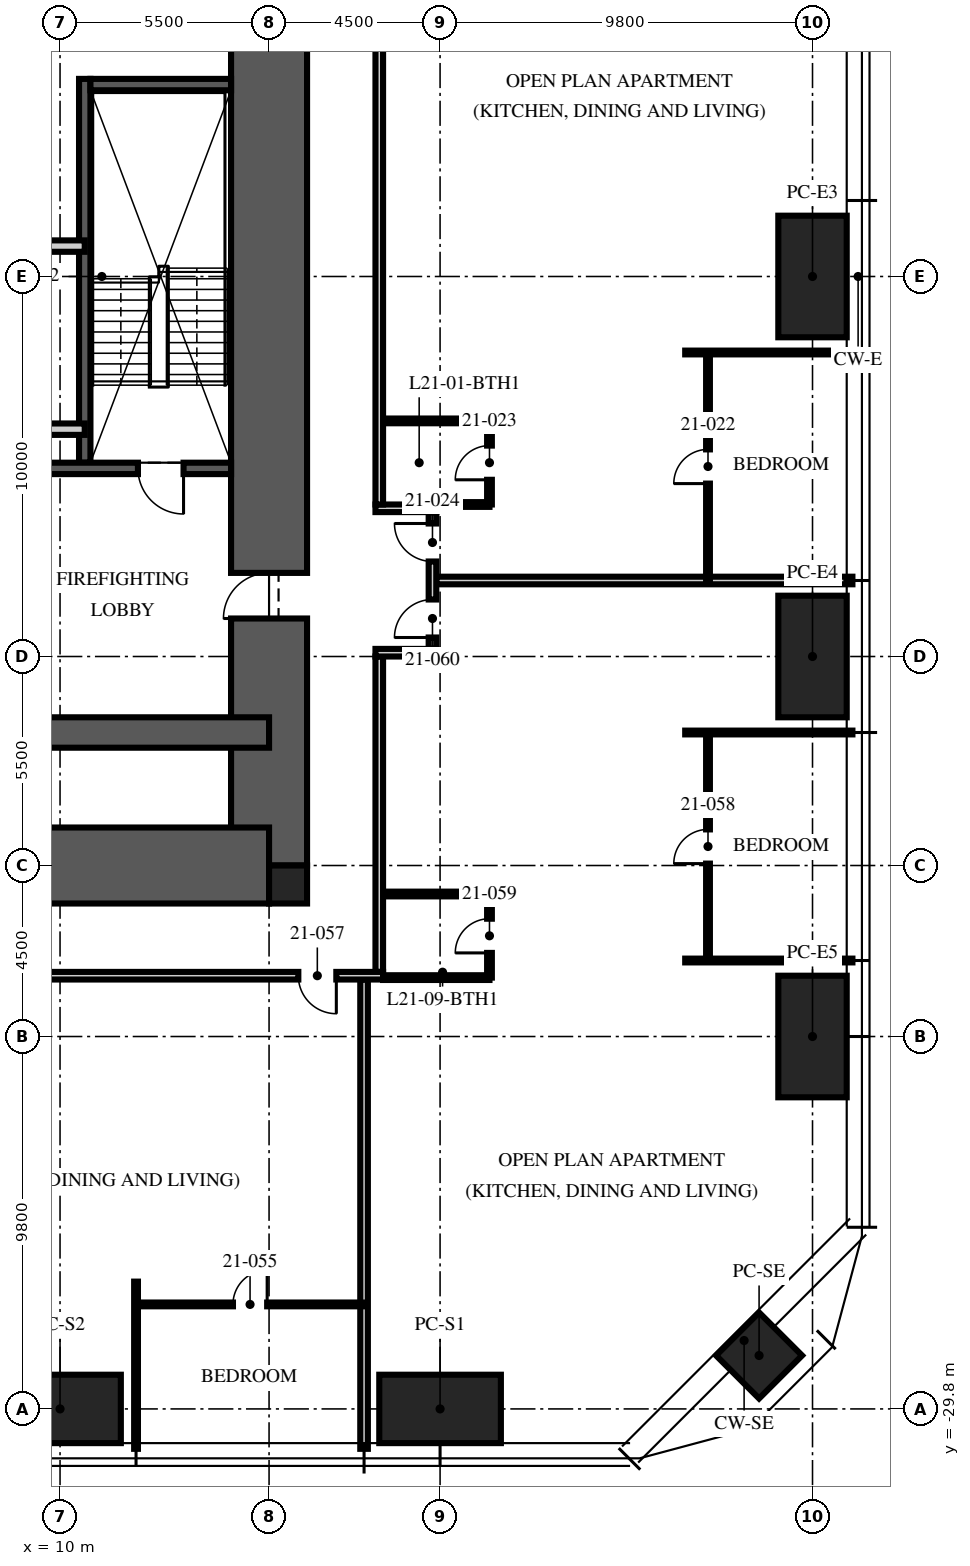
"""IFC4 building model, lengths in metres.
Left out: names, types, materials, properties, quantities, classifications, styles, units other than length and angle.
Written with IfcOpenShell. Run it as: python <this file> out.ifc"""

import sys

from ifc_helpers import new_model, si_unit, direction, frame, frame_2d, origin, origin_2d, place, context, subcontext, project, spatial, rectangle, hollow_rectangle, extrude, element, fill, save


model = new_model("IFC4")
c1 = context("Model", 3, precision=1e-05, world=origin(), true_north=direction((0.0, 1.0)))
c2 = subcontext(c1, "Body", "Model", "MODEL_VIEW")
j1 = project(units=[si_unit("LENGTHUNIT", "METRE"), si_unit("PLANEANGLEUNIT", "RADIAN")], contexts=[c1])
p1 = place(None, origin())
s1 = spatial("IfcSite", under=j1, at=p1, CompositionType="ELEMENT")
p2 = place(p1, origin())
s2 = spatial("IfcBuilding", under=s1, at=p2, CompositionType="ELEMENT")
p3 = place(p2, frame((0.0, 0.0, 84.75)))
s3 = spatial("IfcBuildingStorey", under=s2, at=p3, CompositionType="ELEMENT", Elevation=84.75)
p4 = place(p3, frame((15.5, -15.5, -0.25), z_axis=(0.0, 0.0, 1.0), x_axis=(0.0, 1.0, 0.0)))
e1 = element("IfcWall", 1, at=p4, inside=s3, PredefinedType="SHEAR", context=c2, shape_type="SweptSolid", body=[
    extrude(rectangle(XDim=31.0, YDim=2.0, at=frame_2d((15.5, 0.0))), origin(), (0.0, 0.0, 1.0), 3.75),
])
p5 = place(p4, frame((6.5, 0.0, 0.25)))
e2 = element("IfcOpeningElement", 2, at=p5, cuts=e1, PredefinedType="OPENING", context=c2, shape_type="SweptSolid", body=[
    extrude(rectangle(XDim=1.2, YDim=2.1, at=frame_2d((0.6, 1.05))), frame((0.0, 1.01, 0.0), z_axis=(0.0, -1.0, 0.0), x_axis=(1.0, 0.0, 0.0)), (0.0, 0.0, 1.0), 2.02),
])
p6 = place(p4, frame((23.0, 0.0, 0.25)))
e3 = element("IfcOpeningElement", 3, at=p6, cuts=e1, PredefinedType="OPENING", context=c2, shape_type="SweptSolid", body=[
    extrude(rectangle(XDim=1.8, YDim=2.1, at=frame_2d((0.9, 1.05))), frame((0.0, 1.01, 0.0), z_axis=(0.0, -1.0, 0.0), x_axis=(1.0, 0.0, 0.0)), (0.0, 0.0, 1.0), 2.02),
])
p7 = place(p3, frame((-15.5, -15.5, -0.25), z_axis=(0.0, 0.0, 1.0), x_axis=(1.0, 0.0, 0.0)))
e4 = element("IfcWall", 4, at=p7, inside=s3, PredefinedType="SHEAR", context=c2, shape_type="SweptSolid", body=[
    extrude(rectangle(XDim=31.0, YDim=2.0, at=frame_2d((15.5, 0.0))), origin(), (0.0, 0.0, 1.0), 3.75),
])
p8 = place(p3, frame((-15.5, -12.0, -0.25), z_axis=(0.0, 0.0, 1.0), x_axis=(1.0, 0.0, 0.0)))
e5 = element("IfcWall", 5, at=p8, inside=s3, PredefinedType="SHEAR", context=c2, shape_type="SweptSolid", body=[
    extrude(rectangle(XDim=31.0, YDim=0.8, at=frame_2d((15.5, 0.0))), origin(), (0.0, 0.0, 1.0), 3.75),
])
p9 = place(p3, frame((16.0, -16.0, -0.25), z_axis=(0.0, 0.0, 1.0), x_axis=(1.0, 0.0, 0.0)))
e6 = element("IfcColumn", 6, at=p9, inside=s3, PredefinedType="COLUMN", context=c2, shape_type="SweptSolid", body=[
    extrude(rectangle(XDim=1.0, YDim=1.0, at=origin_2d()), origin(), (0.0, 0.0, 1.0), 3.75),
])
for number, where, z_axis, x_axis in (
    (7, (29.8, 0.0, 0.0), (0.0, 0.0, 1.0), (0.0, 1.0, 0.0)),
    (8, (29.8, -10.0, 0.0), (0.0, 0.0, 1.0), (0.0, 1.0, 0.0)),
    (9, (29.8, -20.0, 0.0), (0.0, 0.0, 1.0), (0.0, 1.0, 0.0)),
    (10, (20.0, -29.8, 0.0), (0.0, 0.0, 1.0), (1.0, 0.0, 0.0)),
    (11, (10.0, -29.8, 0.0), (0.0, 0.0, 1.0), (1.0, 0.0, 0.0)),
):
    element("IfcColumn", number, at=place(p3, frame(where, z_axis=z_axis, x_axis=x_axis)), inside=s3, PredefinedType="COLUMN", context=c2, shape_type="SweptSolid", body=[
        extrude(hollow_rectangle(XDim=3.2, YDim=1.8, WallThickness=0.2, at=origin_2d()), origin(), (0.0, 0.0, 1.0), 3.75),
    ])
p10 = place(p3, frame((28.394, -28.394, 0.0), z_axis=(0.0, 0.0, 1.0), x_axis=(0.707106781187, 0.707106781187, 0.0)))
e12 = element("IfcColumn", 12, at=p10, inside=s3, PredefinedType="COLUMN", context=c2, shape_type="SweptSolid", body=[
    extrude(hollow_rectangle(XDim=1.6, YDim=1.6, WallThickness=0.1, at=origin_2d()), origin(), (0.0, 0.0, 1.0), 3.75),
])
p11 = place(p3, frame((10.65, -4.9, 0.0), z_axis=(0.0, 0.0, 1.0), x_axis=(0.0, 1.0, 0.0)))
e13 = element("IfcWall", 13, at=p11, inside=s3, PredefinedType="SOLIDWALL", context=c2, shape_type="SweptSolid", body=[
    extrude(rectangle(XDim=10.1, YDim=0.3, at=frame_2d((5.05, 0.0))), origin(), (0.0, 0.0, 1.0), 3.5),
])
p12 = place(p3, frame((14.5, -5.05, 0.0), z_axis=(0.0, 0.0, 1.0), x_axis=(-1.0, 0.0, 0.0)))
e14 = element("IfcWall", 14, at=p12, inside=s3, PredefinedType="SOLIDWALL", context=c2, shape_type="SweptSolid", body=[
    extrude(rectangle(XDim=5.7, YDim=0.3, at=frame_2d((2.85, 0.0))), origin(), (0.0, 0.0, 1.0), 3.5),
])
p13 = place(p12, frame((1.25, 0.0, 0.0)))
e15 = element("IfcOpeningElement", 15, at=p13, cuts=e14, PredefinedType="OPENING", context=c2, shape_type="SweptSolid", body=[
    extrude(rectangle(XDim=1.2, YDim=2.1, at=frame_2d((0.6, 1.05))), frame((0.0, 0.16, 0.0), z_axis=(0.0, -1.0, 0.0), x_axis=(1.0, 0.0, 0.0)), (0.0, 0.0, 1.0), 0.32),
])
p14 = place(p3, frame((14.5, 5.05, 0.0), z_axis=(0.0, 0.0, 1.0), x_axis=(-1.0, 0.0, 0.0)))
e16 = element("IfcWall", 16, at=p14, inside=s3, PredefinedType="SOLIDWALL", context=c2, shape_type="SweptSolid", body=[
    extrude(rectangle(XDim=3.7, YDim=0.3, at=frame_2d((1.85, 0.0))), origin(), (0.0, 0.0, 1.0), 3.5),
])
p15 = place(p3, frame((-10.65, 0.8, 0.0), z_axis=(0.0, 0.0, 1.0), x_axis=(1.0, 0.0, 0.0)))
e17 = element("IfcWall", 17, at=p15, inside=s3, PredefinedType="PARTITIONING", context=c2, shape_type="SweptSolid", body=[
    extrude(rectangle(XDim=21.3, YDim=0.3, at=frame_2d((10.65, 0.0))), origin(), (0.0, 0.0, 1.0), 3.5),
])
p16 = place(p15, frame((10.05, 0.0, 0.0)))
e18 = element("IfcOpeningElement", 18, at=p16, cuts=e17, PredefinedType="OPENING", context=c2, shape_type="SweptSolid", body=[
    extrude(rectangle(XDim=1.2, YDim=2.1, at=frame_2d((0.6, 1.05))), frame((0.0, 0.16, 0.0), z_axis=(0.0, -1.0, 0.0), x_axis=(1.0, 0.0, 0.0)), (0.0, 0.0, 1.0), 0.32),
])
p17 = place(p15, frame((0.793, 0.0, 0.0)))
e19 = element("IfcOpeningElement", 19, at=p17, cuts=e17, PredefinedType="OPENING", context=c2, shape_type="SweptSolid", body=[
    extrude(rectangle(XDim=0.9, YDim=2.1, at=frame_2d((0.45, 1.05))), frame((0.0, 0.16, 0.0), z_axis=(0.0, -1.0, 0.0), x_axis=(1.0, 0.0, 0.0)), (0.0, 0.0, 1.0), 0.32),
])
p18 = place(p3, frame((10.65, -4.018, 0.0), z_axis=(0.0, 0.0, 1.0), x_axis=(-1.0, 0.0, 0.0)))
e20 = element("IfcWall", 20, at=p18, inside=s3, PredefinedType="PARTITIONING", context=c2, shape_type="SweptSolid", body=[
    extrude(rectangle(XDim=6.45, YDim=0.3, at=frame_2d((3.225, 0.0))), origin(), (0.0, 0.0, 1.0), 3.5),
])
p19 = place(p3, frame((19.9, -8.0, 0.0), z_axis=(0.0, 0.0, 1.0), x_axis=(1.0, 0.0, 0.0)))
e21 = element("IfcWall", 21, at=p19, inside=s3, PredefinedType="PARTITIONING", context=c2, shape_type="SweptSolid", body=[
    extrude(rectangle(XDim=10.95, YDim=0.2, at=frame_2d((5.475, 0.0))), origin(), (0.0, 0.0, 1.0), 2.71),
])
for number, where, z_axis, x_axis in (
    (22, (26.45, -2.0, 0.0), (0.0, 0.0, 1.0), (1.0, 0.0, 0.0)),
    (23, (12.0, -26.45, 0.0), (0.0, 0.0, 1.0), (0.0, -1.0, 0.0)),
):
    element("IfcWall", number, at=place(p3, frame(where, z_axis=z_axis, x_axis=x_axis)), inside=s3, PredefinedType="PARTITIONING", context=c2, shape_type="SweptSolid", body=[
        extrude(rectangle(XDim=4.4, YDim=0.1, at=frame_2d((2.2, 0.0))), origin(), (0.0, 0.0, 1.0), 2.71),
    ])
p20 = place(p3, frame((18.0, -18.5, 0.0), z_axis=(0.0, 0.0, 1.0), x_axis=(0.0, -1.0, 0.0)))
e24 = element("IfcWall", 24, at=p20, inside=s3, PredefinedType="PARTITIONING", context=c2, shape_type="SweptSolid", body=[
    extrude(rectangle(XDim=12.35, YDim=0.2, at=frame_2d((6.175, 0.0))), origin(), (0.0, 0.0, 1.0), 2.3),
])
for number, where, z_axis, x_axis in (
    (25, (26.45, -18.0, 0.0), (0.0, 0.0, 1.0), (1.0, 0.0, 0.0)),
    (26, (26.45, -12.0, 0.0), (0.0, 0.0, 1.0), (1.0, 0.0, 0.0)),
):
    element("IfcWall", number, at=place(p3, frame(where, z_axis=z_axis, x_axis=x_axis)), inside=s3, PredefinedType="PARTITIONING", context=c2, shape_type="SweptSolid", body=[
        extrude(rectangle(XDim=4.4, YDim=0.1, at=frame_2d((2.2, 0.0))), origin(), (0.0, 0.0, 1.0), 2.71),
    ])
p21 = place(p3, frame((27.05, -8.0, 0.0), z_axis=(0.0, 0.0, 1.0), x_axis=(0.0, 1.0, 0.0)))
e27 = element("IfcWall", 27, at=p21, inside=s3, PredefinedType="PARTITIONING", context=c2, shape_type="SweptSolid", body=[
    extrude(rectangle(XDim=6.0, YDim=0.1, at=frame_2d((3.0, 0.0))), origin(), (0.0, 0.0, 1.0), 2.61),
])
p22 = place(p21, frame((2.55, 0.0, 0.0)))
e28 = element("IfcOpeningElement", 28, at=p22, cuts=e27, PredefinedType="OPENING", context=c2, shape_type="SweptSolid", body=[
    extrude(rectangle(XDim=0.9, YDim=2.1, at=frame_2d((0.45, 1.05))), frame((0.0, 0.06, 0.0), z_axis=(0.0, -1.0, 0.0), x_axis=(1.0, 0.0, 0.0)), (0.0, 0.0, 1.0), 0.12),
])
p23 = place(p3, frame((21.3, -6.0, 0.0), z_axis=(0.0, 0.0, 1.0), x_axis=(0.0, 1.0, 0.0)))
e29 = element("IfcWall", 29, at=p23, inside=s3, PredefinedType="PARTITIONING", context=c2, shape_type="SweptSolid", body=[
    extrude(rectangle(XDim=2.2, YDim=0.125, at=frame_2d((1.1, 0.0))), origin(), (0.0, 0.0, 1.0), 2.61),
])
p24 = place(p23, frame((0.65, 0.0, 0.0)))
e30 = element("IfcOpeningElement", 30, at=p24, cuts=e29, PredefinedType="OPENING", context=c2, shape_type="SweptSolid", body=[
    extrude(rectangle(XDim=0.9, YDim=2.1, at=frame_2d((0.45, 1.05))), frame((0.0, 0.073, 0.0), z_axis=(0.0, -1.0, 0.0), x_axis=(1.0, 0.0, 0.0)), (0.0, 0.0, 1.0), 0.145),
])
p25 = place(p3, frame((19.97, -6.0, 0.0), z_axis=(0.0, 0.0, 1.0), x_axis=(1.0, 0.0, 0.0)))
e31 = element("IfcWall", 31, at=p25, inside=s3, PredefinedType="PARTITIONING", context=c2, shape_type="SweptSolid", body=[
    extrude(rectangle(XDim=1.33, YDim=0.125, at=frame_2d((0.665, 0.0))), origin(), (0.0, 0.0, 1.0), 3.5),
])
p26 = place(p3, frame((18.5, -3.8, 0.0), z_axis=(0.0, 0.0, 1.0), x_axis=(1.0, 0.0, 0.0)))
e32 = element("IfcWall", 32, at=p26, inside=s3, PredefinedType="PARTITIONING", context=c2, shape_type="SweptSolid", body=[
    extrude(rectangle(XDim=2.8, YDim=0.125, at=frame_2d((1.4, 0.0))), origin(), (0.0, 0.0, 1.0), 3.5),
])
p27 = place(p3, frame((12.0, -27.05, 0.0), z_axis=(0.0, 0.0, 1.0), x_axis=(1.0, 0.0, 0.0)))
e33 = element("IfcWall", 33, at=p27, inside=s3, PredefinedType="PARTITIONING", context=c2, shape_type="SweptSolid", body=[
    extrude(rectangle(XDim=6.0, YDim=0.1, at=frame_2d((3.0, 0.0))), origin(), (0.0, 0.0, 1.0), 2.61),
])
p28 = place(p27, frame((2.55, 0.0, 0.0)))
e34 = element("IfcOpeningElement", 34, at=p28, cuts=e33, PredefinedType="OPENING", context=c2, shape_type="SweptSolid", body=[
    extrude(rectangle(XDim=0.9, YDim=2.1, at=frame_2d((0.45, 1.05))), frame((0.0, 0.06, 0.0), z_axis=(0.0, -1.0, 0.0), x_axis=(1.0, 0.0, 0.0)), (0.0, 0.0, 1.0), 0.12),
])
p29 = place(p3, frame((27.05, -18.0, 0.0), z_axis=(0.0, 0.0, 1.0), x_axis=(0.0, 1.0, 0.0)))
e35 = element("IfcWall", 35, at=p29, inside=s3, PredefinedType="PARTITIONING", context=c2, shape_type="SweptSolid", body=[
    extrude(rectangle(XDim=6.0, YDim=0.1, at=frame_2d((3.0, 0.0))), origin(), (0.0, 0.0, 1.0), 2.61),
])
p30 = place(p29, frame((2.55, 0.0, 0.0)))
e36 = element("IfcOpeningElement", 36, at=p30, cuts=e35, PredefinedType="OPENING", context=c2, shape_type="SweptSolid", body=[
    extrude(rectangle(XDim=0.9, YDim=2.1, at=frame_2d((0.45, 1.05))), frame((0.0, 0.06, 0.0), z_axis=(0.0, -1.0, 0.0), x_axis=(1.0, 0.0, 0.0)), (0.0, 0.0, 1.0), 0.12),
])
p31 = place(p3, frame((21.3, -18.45, 0.0), z_axis=(0.0, 0.0, 1.0), x_axis=(0.0, 1.0, 0.0)))
e37 = element("IfcWall", 37, at=p31, inside=s3, PredefinedType="PARTITIONING", context=c2, shape_type="SweptSolid", body=[
    extrude(rectangle(XDim=2.2, YDim=0.125, at=frame_2d((1.1, 0.0))), origin(), (0.0, 0.0, 1.0), 3.5),
])
p32 = place(p31, frame((0.65, 0.0, 0.0)))
e38 = element("IfcOpeningElement", 38, at=p32, cuts=e37, PredefinedType="OPENING", context=c2, shape_type="SweptSolid", body=[
    extrude(rectangle(XDim=0.9, YDim=2.1, at=frame_2d((0.45, 1.05))), frame((0.0, 0.073, 0.0), z_axis=(0.0, -1.0, 0.0), x_axis=(1.0, 0.0, 0.0)), (0.0, 0.0, 1.0), 0.145),
])
p33 = place(p3, frame((18.5, -18.45, 0.0), z_axis=(0.0, 0.0, 1.0), x_axis=(1.0, 0.0, 0.0)))
e39 = element("IfcWall", 39, at=p33, inside=s3, PredefinedType="PARTITIONING", context=c2, shape_type="SweptSolid", body=[
    extrude(rectangle(XDim=2.8, YDim=0.125, at=frame_2d((1.4, 0.0))), origin(), (0.0, 0.0, 1.0), 2.3),
])
p34 = place(p3, frame((18.5, -16.25, 0.0), z_axis=(0.0, 0.0, 1.0), x_axis=(1.0, 0.0, 0.0)))
e40 = element("IfcWall", 40, at=p34, inside=s3, PredefinedType="PARTITIONING", context=c2, shape_type="SweptSolid", body=[
    extrude(rectangle(XDim=2.8, YDim=0.125, at=frame_2d((1.4, 0.0))), origin(), (0.0, 0.0, 1.0), 3.5),
])
p35 = place(p3, frame((18.4, -18.3, 0.0), z_axis=(0.0, 0.0, 1.0), x_axis=(0.0, 1.0, 0.0)))
e41 = element("IfcWall", 41, at=p35, inside=s3, PredefinedType="PARTITIONING", context=c2, shape_type="SweptSolid", body=[
    extrude(rectangle(XDim=8.3, YDim=0.2, at=frame_2d((4.15, 0.0))), origin(), (0.0, 0.0, 1.0), 2.3),
])
p36 = place(p3, frame((18.3, -9.9, 0.0), z_axis=(0.0, 0.0, 1.0), x_axis=(1.0, 0.0, 0.0)))
e42 = element("IfcWall", 42, at=p36, inside=s3, PredefinedType="PARTITIONING", context=c2, shape_type="SweptSolid", body=[
    extrude(rectangle(XDim=1.6, YDim=0.2, at=frame_2d((0.8, 0.0))), origin(), (0.0, 0.0, 1.0), 2.492),
])
p37 = place(p3, frame((18.3, -6.1, 0.0), z_axis=(0.0, 0.0, 1.0), x_axis=(1.0, 0.0, 0.0)))
e43 = element("IfcWall", 43, at=p37, inside=s3, PredefinedType="PARTITIONING", context=c2, shape_type="SweptSolid", body=[
    extrude(rectangle(XDim=1.6, YDim=0.2, at=frame_2d((0.8, 0.0))), origin(), (0.0, 0.0, 1.0), 3.5),
])
p38 = place(p3, frame((19.8, -9.8, 0.0), z_axis=(0.0, 0.0, 1.0), x_axis=(0.0, 1.0, 0.0)))
e44 = element("IfcWall", 44, at=p38, inside=s3, PredefinedType="PARTITIONING", context=c2, shape_type="SweptSolid", body=[
    extrude(rectangle(XDim=3.6, YDim=0.2, at=frame_2d((1.8, 0.0))), origin(), (0.0, 0.0, 1.0), 3.5),
])
p39 = place(p38, frame((2.3, 0.0, 0.0)))
e45 = element("IfcOpeningElement", 45, at=p39, cuts=e44, PredefinedType="OPENING", context=c2, shape_type="SweptSolid", body=[
    extrude(rectangle(XDim=1.0, YDim=2.2, at=frame_2d((0.5, 1.1))), frame((0.0, 0.11, 0.0), z_axis=(0.0, -1.0, 0.0), x_axis=(1.0, 0.0, 0.0)), (0.0, 0.0, 1.0), 0.22),
])
p40 = place(p38, frame((0.3, 0.0, 0.0)))
e46 = element("IfcOpeningElement", 46, at=p40, cuts=e44, PredefinedType="OPENING", context=c2, shape_type="SweptSolid", body=[
    extrude(rectangle(XDim=1.0, YDim=2.2, at=frame_2d((0.5, 1.1))), frame((0.0, 0.11, 0.0), z_axis=(0.0, -1.0, 0.0), x_axis=(1.0, 0.0, 0.0)), (0.0, 0.0, 1.0), 0.22),
])
p41 = place(p3, frame((18.4, -6.0, 0.0), z_axis=(0.0, 0.0, 1.0), x_axis=(0.0, 1.0, 0.0)))
e47 = element("IfcWall", 47, at=p41, inside=s3, PredefinedType="PARTITIONING", context=c2, shape_type="SweptSolid", body=[
    extrude(rectangle(XDim=24.3, YDim=0.2, at=frame_2d((12.15, 0.0))), origin(), (0.0, 0.0, 1.0), 2.3),
])
p42 = place(p41, frame((22.27, 0.0, 0.0)))
e48 = element("IfcOpeningElement", 48, at=p42, cuts=e47, PredefinedType="OPENING", context=c2, shape_type="SweptSolid", body=[
    extrude(rectangle(XDim=1.0, YDim=2.2, at=frame_2d((0.5, 1.1))), frame((0.0, 0.11, 0.0), z_axis=(0.0, -1.0, 0.0), x_axis=(1.0, 0.0, 0.0)), (0.0, 0.0, 1.0), 0.22),
])
p43 = place(p3, frame((18.5, -18.4, 0.0), z_axis=(0.0, 0.0, 1.0), x_axis=(-1.0, 0.0, 0.0)))
e49 = element("IfcWall", 49, at=p43, inside=s3, PredefinedType="PARTITIONING", context=c2, shape_type="SweptSolid", body=[
    extrude(rectangle(XDim=37.0, YDim=0.2, at=frame_2d((18.5, 0.0))), origin(), (0.0, 0.0, 1.0), 2.3),
])
p44 = place(p43, frame((1.23, 0.0, 0.0)))
e50 = element("IfcOpeningElement", 50, at=p44, cuts=e49, PredefinedType="OPENING", context=c2, shape_type="SweptSolid", body=[
    extrude(rectangle(XDim=1.0, YDim=2.2, at=frame_2d((0.5, 1.1))), frame((0.0, 0.11, 0.0), z_axis=(0.0, -1.0, 0.0), x_axis=(1.0, 0.0, 0.0)), (0.0, 0.0, 1.0), 0.22),
])
p45 = place(p13, origin())
e51 = element("IfcDoor", 51, at=p45, inside=s3, OperationType="SINGLE_SWING_LEFT", PredefinedType="DOOR", context=c2, shape_type="SweptSolid", body=[
    extrude(rectangle(XDim=1.2, YDim=2.1, at=frame_2d((0.6, 1.05))), frame((0.0, 0.025, 0.0), z_axis=(0.0, -1.0, 0.0), x_axis=(1.0, 0.0, 0.0)), (0.0, 0.0, 1.0), 0.05),
])
fill(e15, e51)
p46 = place(p5, origin())
e52 = element("IfcDoor", 52, at=p46, inside=s3, OperationType="SINGLE_SWING_LEFT", PredefinedType="DOOR", context=c2, shape_type="SweptSolid", body=[
    extrude(rectangle(XDim=1.2, YDim=2.1, at=frame_2d((0.6, 1.05))), frame((0.0, 0.025, 0.0), z_axis=(0.0, -1.0, 0.0), x_axis=(1.0, 0.0, 0.0)), (0.0, 0.0, 1.0), 0.05),
])
fill(e2, e52)
p47 = place(p22, origin())
e53 = element("IfcDoor", 53, at=p47, inside=s3, OperationType="SINGLE_SWING_LEFT", PredefinedType="DOOR", context=c2, shape_type="SweptSolid", body=[
    extrude(rectangle(XDim=0.9, YDim=2.1, at=frame_2d((0.45, 1.05))), frame((0.0, 0.025, 0.0), z_axis=(0.0, -1.0, 0.0), x_axis=(1.0, 0.0, 0.0)), (0.0, 0.0, 1.0), 0.05),
])
fill(e28, e53)
p48 = place(p24, origin())
e54 = element("IfcDoor", 54, at=p48, inside=s3, OperationType="SINGLE_SWING_LEFT", PredefinedType="DOOR", context=c2, shape_type="SweptSolid", body=[
    extrude(rectangle(XDim=0.9, YDim=2.1, at=frame_2d((0.45, 1.05))), frame((0.0, 0.025, 0.0), z_axis=(0.0, -1.0, 0.0), x_axis=(1.0, 0.0, 0.0)), (0.0, 0.0, 1.0), 0.05),
])
fill(e30, e54)
p49 = place(p39, origin())
e55 = element("IfcDoor", 55, at=p49, inside=s3, OperationType="SINGLE_SWING_RIGHT", PredefinedType="DOOR", context=c2, shape_type="SweptSolid", body=[
    extrude(rectangle(XDim=1.0, YDim=2.2, at=frame_2d((0.5, 1.1))), frame((0.0, 0.025, 0.0), z_axis=(0.0, -1.0, 0.0), x_axis=(1.0, 0.0, 0.0)), (0.0, 0.0, 1.0), 0.05),
])
fill(e45, e55)
p50 = place(p28, origin())
e56 = element("IfcDoor", 56, at=p50, inside=s3, OperationType="SINGLE_SWING_RIGHT", PredefinedType="DOOR", context=c2, shape_type="SweptSolid", body=[
    extrude(rectangle(XDim=0.9, YDim=2.1, at=frame_2d((0.45, 1.05))), frame((0.0, 0.025, 0.0), z_axis=(0.0, -1.0, 0.0), x_axis=(1.0, 0.0, 0.0)), (0.0, 0.0, 1.0), 0.05),
])
fill(e34, e56)
p51 = place(p44, origin())
e57 = element("IfcDoor", 57, at=p51, inside=s3, OperationType="SINGLE_SWING_LEFT", PredefinedType="DOOR", context=c2, shape_type="SweptSolid", body=[
    extrude(rectangle(XDim=1.0, YDim=2.2, at=frame_2d((0.5, 1.1))), frame((0.0, 0.025, 0.0), z_axis=(0.0, -1.0, 0.0), x_axis=(1.0, 0.0, 0.0)), (0.0, 0.0, 1.0), 0.05),
])
fill(e50, e57)
p52 = place(p30, origin())
e58 = element("IfcDoor", 58, at=p52, inside=s3, OperationType="SINGLE_SWING_LEFT", PredefinedType="DOOR", context=c2, shape_type="SweptSolid", body=[
    extrude(rectangle(XDim=0.9, YDim=2.1, at=frame_2d((0.45, 1.05))), frame((0.0, 0.025, 0.0), z_axis=(0.0, -1.0, 0.0), x_axis=(1.0, 0.0, 0.0)), (0.0, 0.0, 1.0), 0.05),
])
fill(e36, e58)
p53 = place(p32, origin())
e59 = element("IfcDoor", 59, at=p53, inside=s3, OperationType="SINGLE_SWING_LEFT", PredefinedType="DOOR", context=c2, shape_type="SweptSolid", body=[
    extrude(rectangle(XDim=0.9, YDim=2.1, at=frame_2d((0.45, 1.05))), frame((0.0, 0.025, 0.0), z_axis=(0.0, -1.0, 0.0), x_axis=(1.0, 0.0, 0.0)), (0.0, 0.0, 1.0), 0.05),
])
fill(e38, e59)
p54 = place(p40, origin())
e60 = element("IfcDoor", 60, at=p54, inside=s3, OperationType="SINGLE_SWING_LEFT", PredefinedType="DOOR", context=c2, shape_type="SweptSolid", body=[
    extrude(rectangle(XDim=1.0, YDim=2.2, at=frame_2d((0.5, 1.1))), frame((0.0, 0.025, 0.0), z_axis=(0.0, -1.0, 0.0), x_axis=(1.0, 0.0, 0.0)), (0.0, 0.0, 1.0), 0.05),
])
fill(e46, e60)
save(model, sys.argv[1])
